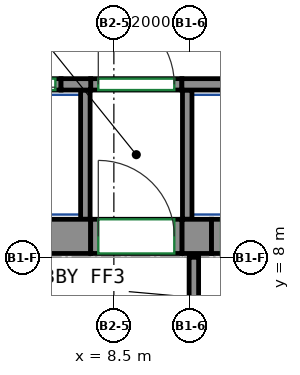
"""IFC4 building model, lengths in metres.
Left out: names, types, materials, properties, quantities, classifications, styles, units other than length and angle.
Written with IfcOpenShell. Run it as: python <this file> out.ifc"""

import sys

from ifc_helpers import new_model, si_unit, direction, frame, frame_2d, origin, place, context, subcontext, project, spatial, rectangle, extrude, source, transform, mapped, element, fill, save


model = new_model("IFC4")
c1 = context("Model", 3, precision=1e-05, world=origin(), true_north=direction((0.0, 1.0)))
c2 = subcontext(c1, "Body", "Model", "MODEL_VIEW")
j1 = project(units=[si_unit("LENGTHUNIT", "METRE"), si_unit("PLANEANGLEUNIT", "RADIAN")], contexts=[c1])
p1 = place(None, origin())
s1 = spatial("IfcSite", under=j1, at=p1, CompositionType="ELEMENT")
p2 = place(p1, origin())
s2 = spatial("IfcBuilding", under=s1, at=p2, CompositionType="ELEMENT")
p3 = place(p2, frame((0.0, 0.0, 116.6)))
s3 = spatial("IfcBuildingStorey", under=s2, at=p3, CompositionType="ELEMENT", Elevation=116.6)
m1 = source(origin(), c2, "Body", "SweptSolid", [
    extrude(rectangle(XDim=14.18, YDim=0.9, at=frame_2d((7.09, 0.0))), origin(), (0.0, 0.0, 1.0), 3.72),
])
p4 = place(p3, frame((-6.29, 8.55, 0.0), z_axis=(0.0, 0.0, 1.0), x_axis=(1.0, 0.0, 0.0)))
e1 = element("IfcWall", 1, at=p4, inside=s3, PredefinedType="SHEAR", context=c2, shape_type="MappedRepresentation", body=[
    mapped(m1, transform((0.0, 0.0, 0.0))),
])
m2 = source(origin(), c2, "Body", "SweptSolid", [
    extrude(rectangle(XDim=0.78, YDim=0.9, at=frame_2d((0.39, 0.0))), origin(), (0.0, 0.0, 1.0), 3.72),
])
p5 = place(p3, frame((10.29, 8.55, 0.0), z_axis=(0.0, 0.0, 1.0), x_axis=(1.0, 0.0, 0.0)))
e2 = element("IfcWall", 2, at=p5, inside=s3, PredefinedType="SHEAR", context=c2, shape_type="MappedRepresentation", body=[
    mapped(m2, transform((0.0, 0.0, 0.0))),
])
m3 = source(origin(), c2, "Body", "SweptSolid", [
    extrude(rectangle(XDim=0.78, YDim=0.3, at=frame_2d((0.39, 0.0))), origin(), (0.0, 0.0, 1.0), 3.72),
])
p6 = place(p3, frame((7.11, 12.55, 0.0), z_axis=(0.0, 0.0, 1.0), x_axis=(1.0, 0.0, 0.0)))
e3 = element("IfcWall", 3, at=p6, inside=s3, PredefinedType="SHEAR", context=c2, shape_type="MappedRepresentation", body=[
    mapped(m3, transform((0.0, 0.0, 0.0))),
])
m4 = source(origin(), c2, "Body", "SweptSolid", [
    extrude(rectangle(XDim=2.82, YDim=0.3, at=frame_2d((1.41, 0.0))), origin(), (0.0, 0.0, 1.0), 3.72),
])
p7 = place(p3, frame((10.29, 12.55, 0.0), z_axis=(0.0, 0.0, 1.0), x_axis=(1.0, 0.0, 0.0)))
e4 = element("IfcWall", 4, at=p7, inside=s3, PredefinedType="SHEAR", context=c2, shape_type="MappedRepresentation", body=[
    mapped(m4, transform((0.0, 0.0, 0.0))),
])
m5 = source(origin(), c2, "Body", "SweptSolid", [
    extrude(rectangle(XDim=1.4, YDim=0.3, at=frame_2d((0.7, 0.0))), origin(), (0.0, 0.0, 1.0), 3.72),
])
p8 = place(p3, frame((5.71, 12.55, 0.0), z_axis=(0.0, 0.0, 1.0), x_axis=(1.0, 0.0, 0.0)))
e5 = element("IfcWall", 5, at=p8, inside=s3, PredefinedType="PARTITIONING", context=c2, shape_type="MappedRepresentation", body=[
    mapped(m5, transform((0.0, 0.0, 0.0))),
])
p9 = place(p8, frame((0.15, 0.0, 0.0)))
e6 = element("IfcOpeningElement", 6, at=p9, cuts=e5, PredefinedType="OPENING", context=c2, shape_type="SweptSolid", body=[
    extrude(rectangle(XDim=1.1, YDim=2.1, at=frame_2d((0.55, 1.05))), frame((0.0, 0.16, 0.0), z_axis=(0.0, -1.0, 0.0), x_axis=(1.0, 0.0, 0.0)), (0.0, 0.0, 1.0), 0.32),
])
m6 = source(origin(), c2, "Body", "SweptSolid", [
    extrude(rectangle(XDim=2.4, YDim=0.3, at=frame_2d((1.2, 0.0))), origin(), (0.0, 0.0, 1.0), 3.72),
])
p10 = place(p3, frame((7.89, 12.55, 0.0), z_axis=(0.0, 0.0, 1.0), x_axis=(1.0, 0.0, 0.0)))
e7 = element("IfcWall", 7, at=p10, inside=s3, PredefinedType="PARTITIONING", context=c2, shape_type="MappedRepresentation", body=[
    mapped(m6, transform((0.0, 0.0, 0.0))),
])
p11 = place(p10, frame((0.2, 0.0, 0.0)))
e8 = element("IfcOpeningElement", 8, at=p11, cuts=e7, PredefinedType="OPENING", context=c2, shape_type="SweptSolid", body=[
    extrude(rectangle(XDim=2.0, YDim=2.1, at=frame_2d((1.0, 1.05))), frame((0.0, 0.16, 0.0), z_axis=(0.0, -1.0, 0.0), x_axis=(1.0, 0.0, 0.0)), (0.0, 0.0, 1.0), 0.32),
])
m7 = source(origin(), c2, "Body", "SweptSolid", [
    extrude(rectangle(XDim=2.65, YDim=0.25, at=frame_2d((1.325, 0.0))), origin(), (0.0, 0.0, 1.0), 3.72),
])
p12 = place(p3, frame((10.605, 5.35, 0.0), z_axis=(0.0, 0.0, 1.0), x_axis=(0.0, 1.0, 0.0)))
e9 = element("IfcWall", 9, at=p12, inside=s3, PredefinedType="PARTITIONING", context=c2, shape_type="MappedRepresentation", body=[
    mapped(m7, transform((0.0, 0.0, 0.0))),
])
m8 = source(origin(), c2, "Body", "SweptSolid", [
    extrude(rectangle(XDim=3.4, YDim=0.25, at=frame_2d((1.7, 0.0))), origin(), (0.0, 0.0, 1.0), 3.72),
])
for number, where, z_axis, x_axis in (
    (10, (10.43, 9.0, 0.0), (0.0, 0.0, 1.0), (0.0, 1.0, 0.0)),
    (11, (7.75, 9.0, 0.0), (0.0, 0.0, 1.0), (0.0, 1.0, 0.0)),
):
    element("IfcWall", number, at=place(p3, frame(where, z_axis=z_axis, x_axis=x_axis)), inside=s3, PredefinedType="PARTITIONING", context=c2, shape_type="MappedRepresentation", body=[
        mapped(m8, transform((0.0, 0.0, 0.0))),
    ])
m9 = source(origin(), c2, "Body", "SweptSolid", [
    extrude(rectangle(XDim=2.4, YDim=0.9, at=frame_2d((1.2, 0.0))), origin(), (0.0, 0.0, 1.0), 2.7),
])
p13 = place(p3, frame((7.89, 8.55, 0.0), z_axis=(0.0, 0.0, 1.0), x_axis=(1.0, 0.0, 0.0)))
e12 = element("IfcWall", 12, at=p13, inside=s3, PredefinedType="PARTITIONING", context=c2, shape_type="MappedRepresentation", body=[
    mapped(m9, transform((0.0, 0.0, 0.0))),
])
p14 = place(p13, frame((0.2, 0.0, 0.0)))
e13 = element("IfcOpeningElement", 13, at=p14, cuts=e12, PredefinedType="OPENING", context=c2, shape_type="SweptSolid", body=[
    extrude(rectangle(XDim=2.0, YDim=2.1, at=frame_2d((1.0, 1.05))), frame((0.0, 0.46, 0.0), z_axis=(0.0, -1.0, 0.0), x_axis=(1.0, 0.0, 0.0)), (0.0, 0.0, 1.0), 0.92),
])
m10 = source(origin(), c2, "Body", "SweptSolid", [
    extrude(rectangle(XDim=1.4, YDim=0.9, at=frame_2d((0.7, 0.0))), origin(), (0.0, 0.0, 1.0), 2.7),
])
p15 = place(p3, frame((11.07, 8.55, 0.0), z_axis=(0.0, 0.0, 1.0), x_axis=(1.0, 0.0, 0.0)))
e14 = element("IfcWall", 14, at=p15, inside=s3, PredefinedType="PARTITIONING", context=c2, shape_type="MappedRepresentation", body=[
    mapped(m10, transform((0.0, 0.0, 0.0))),
])
p16 = place(p15, frame((0.25, 0.0, 0.0)))
e15 = element("IfcOpeningElement", 15, at=p16, cuts=e14, PredefinedType="OPENING", context=c2, shape_type="SweptSolid", body=[
    extrude(rectangle(XDim=0.9, YDim=2.1, at=frame_2d((0.45, 1.05))), frame((0.0, 0.46, 0.0), z_axis=(0.0, -1.0, 0.0), x_axis=(1.0, 0.0, 0.0)), (0.0, 0.0, 1.0), 0.92),
])
p17 = place(p11, origin())
e16 = element("IfcDoor", 16, at=p17, inside=s3, OperationType="DOUBLE_DOOR_SINGLE_SWING", PredefinedType="DOOR", context=c2, shape_type="SweptSolid", body=[
    extrude(rectangle(XDim=2.0, YDim=2.1, at=frame_2d((1.0, 1.05))), frame((0.0, 0.025, 0.0), z_axis=(0.0, -1.0, 0.0), x_axis=(1.0, 0.0, 0.0)), (0.0, 0.0, 1.0), 0.05),
])
fill(e8, e16)
p18 = place(p14, origin())
e17 = element("IfcDoor", 17, at=p18, inside=s3, OperationType="DOUBLE_DOOR_SINGLE_SWING", PredefinedType="DOOR", context=c2, shape_type="SweptSolid", body=[
    extrude(rectangle(XDim=2.0, YDim=2.1, at=frame_2d((1.0, 1.05))), frame((0.0, 0.355, 0.0), z_axis=(0.0, -1.0, 0.0), x_axis=(1.0, 0.0, 0.0)), (0.0, 0.0, 1.0), 0.05),
])
fill(e13, e17)
p19 = place(p9, origin())
e18 = element("IfcDoor", 18, at=p19, inside=s3, OperationType="DOUBLE_DOOR_SLIDING", PredefinedType="DOOR", context=c2, shape_type="SweptSolid", body=[
    extrude(rectangle(XDim=1.1, YDim=2.1, at=frame_2d((0.55, 1.05))), frame((0.0, 0.025, 0.0), z_axis=(0.0, -1.0, 0.0), x_axis=(1.0, 0.0, 0.0)), (0.0, 0.0, 1.0), 0.05),
])
fill(e6, e18)
save(model, sys.argv[1])
